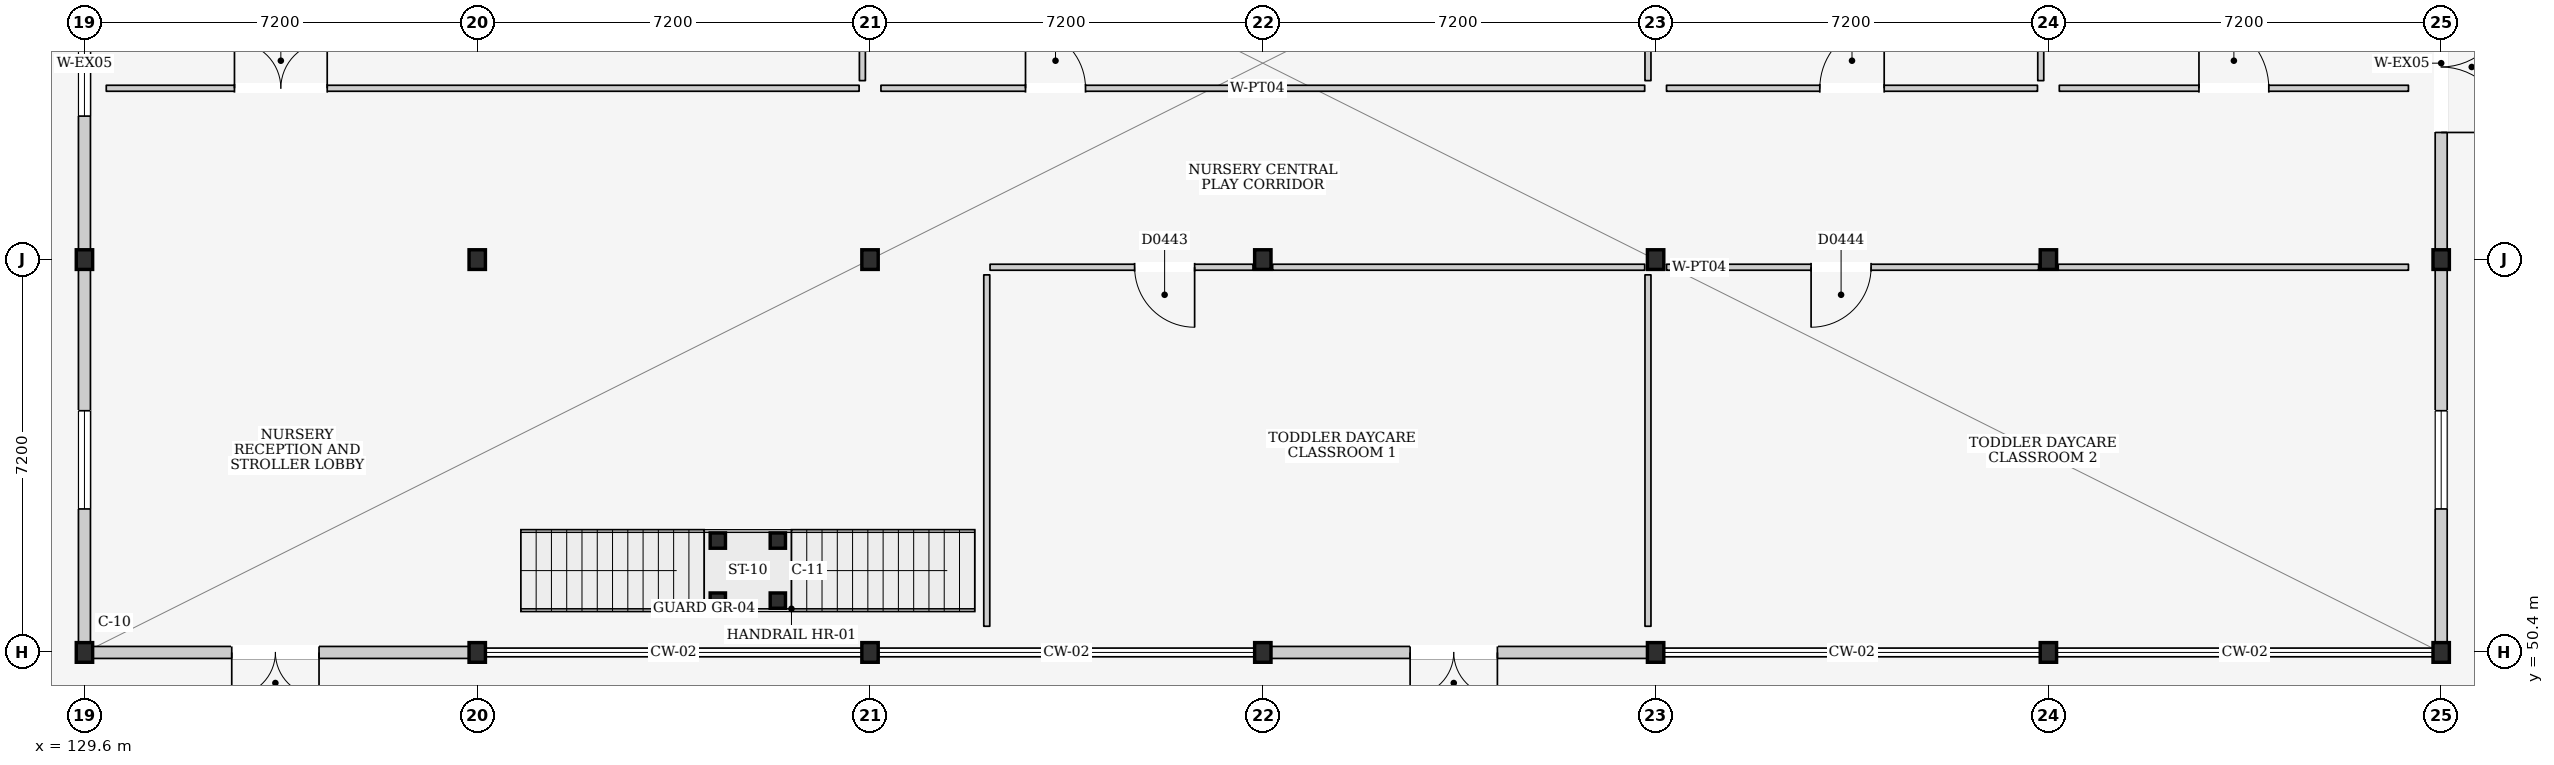
"""IFC4 building model, lengths in metres.
Left out: names, types, materials, properties, quantities, classifications, styles, units other than length and angle.
Written with IfcOpenShell. Run it as: python <this file> out.ifc"""

import sys

from ifc_helpers import new_model, si_unit, direction, frame, frame_2d, origin, origin_2d, place, context, subcontext, project, spatial, rectangle, i_section, extrude, element, fill, save


model = new_model("IFC4")
c1 = context("Model", 3, precision=1e-05, world=origin(), true_north=direction((0.0, 1.0)))
c2 = subcontext(c1, "Body", "Model", "MODEL_VIEW")
j1 = project(units=[si_unit("LENGTHUNIT", "METRE"), si_unit("PLANEANGLEUNIT", "RADIAN")], contexts=[c1])
p1 = place(None, origin())
s1 = spatial("IfcSite", under=j1, at=p1, CompositionType="ELEMENT")
p2 = place(p1, origin())
s2 = spatial("IfcBuilding", under=s1, at=p2, CompositionType="ELEMENT")
p3 = place(p2, origin())
s3 = spatial("IfcBuildingStorey", under=s2, at=p3, CompositionType="ELEMENT", Elevation=0.0)
for number, where, z_axis, x_axis in (
    (1, (129.6, 50.4, 0.0), (0.0, 0.0, 1.0), (1.0, 0.0, 0.0)),
    (2, (129.6, 57.6, 0.0), (0.0, 0.0, 1.0), (1.0, 0.0, 0.0)),
    (3, (136.8, 50.4, 0.0), (0.0, 0.0, 1.0), (1.0, 0.0, 0.0)),
    (4, (136.8, 57.6, 0.0), (0.0, 0.0, 1.0), (1.0, 0.0, 0.0)),
    (5, (144.0, 50.4, 0.0), (0.0, 0.0, 1.0), (1.0, 0.0, 0.0)),
    (6, (144.0, 57.6, 0.0), (0.0, 0.0, 1.0), (1.0, 0.0, 0.0)),
    (7, (151.2, 50.4, 0.0), (0.0, 0.0, 1.0), (1.0, 0.0, 0.0)),
    (8, (151.2, 57.6, 0.0), (0.0, 0.0, 1.0), (1.0, 0.0, 0.0)),
    (9, (158.4, 50.4, 0.0), (0.0, 0.0, 1.0), (1.0, 0.0, 0.0)),
    (10, (158.4, 57.6, 0.0), (0.0, 0.0, 1.0), (1.0, 0.0, 0.0)),
    (11, (165.6, 50.4, 0.0), (0.0, 0.0, 1.0), (1.0, 0.0, 0.0)),
    (12, (165.6, 57.6, 0.0), (0.0, 0.0, 1.0), (1.0, 0.0, 0.0)),
    (13, (172.8, 50.4, 0.0), (0.0, 0.0, 1.0), (1.0, 0.0, 0.0)),
    (14, (172.8, 57.6, 0.0), (0.0, 0.0, 1.0), (1.0, 0.0, 0.0)),
):
    element("IfcColumn", number, at=place(p3, frame(where, z_axis=z_axis, x_axis=x_axis)), inside=s3, PredefinedType="COLUMN", context=c2, shape_type="SweptSolid", body=[
        extrude(i_section(OverallWidth=0.3, OverallDepth=0.36, WebThickness=0.012, FlangeThickness=0.022, at=origin_2d()), origin(), (0.0, 0.0, 1.0), 4.5),
    ])
p4 = place(p3, frame((129.75, 50.4, 0.0), z_axis=(0.0, 0.0, 1.0), x_axis=(1.0, 0.0, 0.0)))
e15 = element("IfcWall", 15, at=p4, inside=s3, PredefinedType="ELEMENTEDWALL", context=c2, shape_type="SweptSolid", body=[
    extrude(rectangle(XDim=6.9, YDim=0.22, at=frame_2d((3.45, 0.0))), origin(), (0.0, 0.0, 1.0), 3.585),
])
p5 = place(p4, frame((2.55, 0.0, 0.0)))
e16 = element("IfcOpeningElement", 16, at=p5, cuts=e15, PredefinedType="OPENING", context=c2, shape_type="SweptSolid", body=[
    extrude(rectangle(XDim=1.6, YDim=2.2, at=frame_2d((0.8, 1.1))), frame((0.0, 0.125, 0.0), z_axis=(0.0, -1.0, 0.0), x_axis=(1.0, 0.0, 0.0)), (0.0, 0.0, 1.0), 0.25),
])
p6 = place(p3, frame((151.35, 50.4, 0.0), z_axis=(0.0, 0.0, 1.0), x_axis=(1.0, 0.0, 0.0)))
e17 = element("IfcWall", 17, at=p6, inside=s3, PredefinedType="ELEMENTEDWALL", context=c2, shape_type="SweptSolid", body=[
    extrude(rectangle(XDim=6.9, YDim=0.22, at=frame_2d((3.45, 0.0))), origin(), (0.0, 0.0, 1.0), 3.585),
])
p7 = place(p6, frame((2.55, 0.0, 0.0)))
e18 = element("IfcOpeningElement", 18, at=p7, cuts=e17, PredefinedType="OPENING", context=c2, shape_type="SweptSolid", body=[
    extrude(rectangle(XDim=1.6, YDim=2.2, at=frame_2d((0.8, 1.1))), frame((0.0, 0.125, 0.0), z_axis=(0.0, -1.0, 0.0), x_axis=(1.0, 0.0, 0.0)), (0.0, 0.0, 1.0), 0.25),
])
p8 = place(p3, frame((129.6, 50.58, 0.0), z_axis=(0.0, 0.0, 1.0), x_axis=(0.0, 1.0, 0.0)))
e19 = element("IfcWall", 19, at=p8, inside=s3, PredefinedType="ELEMENTEDWALL", context=c2, shape_type="SweptSolid", body=[
    extrude(rectangle(XDim=6.84, YDim=0.22, at=frame_2d((3.42, 0.0))), origin(), (0.0, 0.0, 1.0), 3.585),
])
p9 = place(p8, frame((2.45, 0.0, 0.9)))
e20 = element("IfcOpeningElement", 20, at=p9, cuts=e19, PredefinedType="OPENING", context=c2, shape_type="SweptSolid", body=[
    extrude(rectangle(XDim=1.8, YDim=1.8, at=frame_2d((0.9, 0.9))), frame((0.0, 0.125, 0.0), z_axis=(0.0, -1.0, 0.0), x_axis=(1.0, 0.0, 0.0)), (0.0, 0.0, 1.0), 0.25),
])
p10 = place(p3, frame((172.8, 50.58, 0.0), z_axis=(0.0, 0.0, 1.0), x_axis=(0.0, 1.0, 0.0)))
e21 = element("IfcWall", 21, at=p10, inside=s3, PredefinedType="ELEMENTEDWALL", context=c2, shape_type="SweptSolid", body=[
    extrude(rectangle(XDim=6.84, YDim=0.22, at=frame_2d((3.42, 0.0))), origin(), (0.0, 0.0, 1.0), 3.585),
])
p11 = place(p10, frame((2.45, 0.0, 0.9)))
e22 = element("IfcOpeningElement", 22, at=p11, cuts=e21, PredefinedType="OPENING", context=c2, shape_type="SweptSolid", body=[
    extrude(rectangle(XDim=1.8, YDim=1.8, at=frame_2d((0.9, 0.9))), frame((0.0, 0.125, 0.0), z_axis=(0.0, -1.0, 0.0), x_axis=(1.0, 0.0, 0.0)), (0.0, 0.0, 1.0), 0.25),
])
p12 = place(p3, frame((129.6, 57.78, 0.0), z_axis=(0.0, 0.0, 1.0), x_axis=(0.0, 1.0, 0.0)))
e23 = element("IfcWall", 23, at=p12, inside=s3, PredefinedType="ELEMENTEDWALL", context=c2, shape_type="SweptSolid", body=[
    extrude(rectangle(XDim=6.84, YDim=0.22, at=frame_2d((3.42, 0.0))), origin(), (0.0, 0.0, 1.0), 3.585),
])
p13 = place(p12, frame((2.45, 0.0, 0.9)))
e24 = element("IfcOpeningElement", 24, at=p13, cuts=e23, PredefinedType="OPENING", context=c2, shape_type="SweptSolid", body=[
    extrude(rectangle(XDim=1.8, YDim=1.8, at=frame_2d((0.9, 0.9))), frame((0.0, 0.125, 0.0), z_axis=(0.0, -1.0, 0.0), x_axis=(1.0, 0.0, 0.0)), (0.0, 0.0, 1.0), 0.25),
])
p14 = place(p3, frame((172.8, 57.78, 0.0), z_axis=(0.0, 0.0, 1.0), x_axis=(0.0, 1.0, 0.0)))
e25 = element("IfcWall", 25, at=p14, inside=s3, PredefinedType="ELEMENTEDWALL", context=c2, shape_type="SweptSolid", body=[
    extrude(rectangle(XDim=6.84, YDim=0.22, at=frame_2d((3.42, 0.0))), origin(), (0.0, 0.0, 1.0), 3.585),
])
p15 = place(p14, frame((2.15, 0.0, 0.0)))
e26 = element("IfcOpeningElement", 26, at=p15, cuts=e25, PredefinedType="OPENING", context=c2, shape_type="SweptSolid", body=[
    extrude(rectangle(XDim=2.4, YDim=2.4, at=frame_2d((1.2, 1.2))), frame((0.0, 0.125, 0.0), z_axis=(0.0, -1.0, 0.0), x_axis=(1.0, 0.0, 0.0)), (0.0, 0.0, 1.0), 0.25),
])
for number, where, z_axis, x_axis in (
    (27, (141.21, 51.35, 0.0), (0.0, 0.0, 1.0), (1.0, 0.0, 0.0)),
    (28, (142.31, 51.35, 0.0), (0.0, 0.0, 1.0), (1.0, 0.0, 0.0)),
    (29, (141.21, 52.45, 0.0), (0.0, 0.0, 1.0), (1.0, 0.0, 0.0)),
    (30, (142.31, 52.45, 0.0), (0.0, 0.0, 1.0), (1.0, 0.0, 0.0)),
):
    element("IfcColumn", number, at=place(p3, frame(where, z_axis=z_axis, x_axis=x_axis)), inside=s3, PredefinedType="COLUMN", context=c2, shape_type="SweptSolid", body=[
        extrude(i_section(OverallWidth=0.28, OverallDepth=0.28, WebThickness=0.01, FlangeThickness=0.018, at=origin_2d()), origin(), (0.0, 0.0, 1.0), 2.05),
    ])
p16 = place(p3, frame((146.2, 57.46, 0.0), z_axis=(0.0, 0.0, 1.0), x_axis=(1.0, 0.0, 0.0)))
e31 = element("IfcWall", 31, at=p16, inside=s3, PredefinedType="PARTITIONING", context=c2, shape_type="SweptSolid", body=[
    extrude(rectangle(XDim=4.82, YDim=0.11, at=frame_2d((2.41, 0.0))), origin(), (0.0, 0.0, 1.0), 3.585),
])
p17 = place(p16, frame((2.65, 0.0, 0.0)))
e32 = element("IfcOpeningElement", 32, at=p17, cuts=e31, PredefinedType="OPENING", context=c2, shape_type="SweptSolid", body=[
    extrude(rectangle(XDim=1.1, YDim=2.25, at=frame_2d((0.55, 1.125))), frame((0.0, 0.07, 0.0), z_axis=(0.0, -1.0, 0.0), x_axis=(1.0, 0.0, 0.0)), (0.0, 0.0, 1.0), 0.14),
])
p18 = place(p3, frame((151.38, 57.46, 0.0), z_axis=(0.0, 0.0, 1.0), x_axis=(1.0, 0.0, 0.0)))
e33 = element("IfcWall", 33, at=p18, inside=s3, PredefinedType="PARTITIONING", context=c2, shape_type="SweptSolid", body=[
    extrude(rectangle(XDim=6.82, YDim=0.11, at=frame_2d((3.41, 0.0))), origin(), (0.0, 0.0, 1.0), 3.585),
])
p19 = place(p3, frame((146.14, 50.88, 0.0), z_axis=(0.0, 0.0, 1.0), x_axis=(0.0, 1.0, 0.0)))
e34 = element("IfcWall", 34, at=p19, inside=s3, PredefinedType="PARTITIONING", context=c2, shape_type="SweptSolid", body=[
    extrude(rectangle(XDim=6.44, YDim=0.11, at=frame_2d((3.22, 0.0))), origin(), (0.0, 0.0, 1.0), 4.2),
])
p20 = place(p3, frame((158.26, 50.88, 0.0), z_axis=(0.0, 0.0, 1.0), x_axis=(0.0, 1.0, 0.0)))
e35 = element("IfcWall", 35, at=p20, inside=s3, PredefinedType="PARTITIONING", context=c2, shape_type="SweptSolid", body=[
    extrude(rectangle(XDim=6.44, YDim=0.11, at=frame_2d((3.22, 0.0))), origin(), (0.0, 0.0, 1.0), 3.585),
])
p21 = place(p3, frame((158.6, 57.46, 0.0), z_axis=(0.0, 0.0, 1.0), x_axis=(1.0, 0.0, 0.0)))
e36 = element("IfcWall", 36, at=p21, inside=s3, PredefinedType="PARTITIONING", context=c2, shape_type="SweptSolid", body=[
    extrude(rectangle(XDim=6.82, YDim=0.11, at=frame_2d((3.41, 0.0))), origin(), (0.0, 0.0, 1.0), 3.585),
])
p22 = place(p21, frame((2.65, 0.0, 0.0)))
e37 = element("IfcOpeningElement", 37, at=p22, cuts=e36, PredefinedType="OPENING", context=c2, shape_type="SweptSolid", body=[
    extrude(rectangle(XDim=1.1, YDim=2.25, at=frame_2d((0.55, 1.125))), frame((0.0, 0.07, 0.0), z_axis=(0.0, -1.0, 0.0), x_axis=(1.0, 0.0, 0.0)), (0.0, 0.0, 1.0), 0.14),
])
p23 = place(p3, frame((165.78, 57.46, 0.0), z_axis=(0.0, 0.0, 1.0), x_axis=(1.0, 0.0, 0.0)))
e38 = element("IfcWall", 38, at=p23, inside=s3, PredefinedType="PARTITIONING", context=c2, shape_type="SweptSolid", body=[
    extrude(rectangle(XDim=6.42, YDim=0.11, at=frame_2d((3.21, 0.0))), origin(), (0.0, 0.0, 1.0), 3.585),
])
p24 = place(p3, frame((130.0, 60.74, 0.0), z_axis=(0.0, 0.0, 1.0), x_axis=(1.0, 0.0, 0.0)))
e39 = element("IfcWall", 39, at=p24, inside=s3, PredefinedType="PARTITIONING", context=c2, shape_type="SweptSolid", body=[
    extrude(rectangle(XDim=13.8, YDim=0.11, at=frame_2d((6.9, 0.0))), origin(), (0.0, 0.0, 1.0), 4.2),
])
p25 = place(p24, frame((2.35, 0.0, 0.0)))
e40 = element("IfcOpeningElement", 40, at=p25, cuts=e39, PredefinedType="OPENING", context=c2, shape_type="SweptSolid", body=[
    extrude(rectangle(XDim=1.7, YDim=2.35, at=frame_2d((0.85, 1.175))), frame((0.0, 0.07, 0.0), z_axis=(0.0, -1.0, 0.0), x_axis=(1.0, 0.0, 0.0)), (0.0, 0.0, 1.0), 0.14),
])
p26 = place(p3, frame((143.86, 60.88, 0.0), z_axis=(0.0, 0.0, 1.0), x_axis=(0.0, 1.0, 0.0)))
e41 = element("IfcWall", 41, at=p26, inside=s3, PredefinedType="PARTITIONING", context=c2, shape_type="SweptSolid", body=[
    extrude(rectangle(XDim=3.74, YDim=0.11, at=frame_2d((1.87, 0.0))), origin(), (0.0, 0.0, 1.0), 3.585),
])
p27 = place(p3, frame((144.2, 60.74, 0.0), z_axis=(0.0, 0.0, 1.0), x_axis=(1.0, 0.0, 0.0)))
e42 = element("IfcWall", 42, at=p27, inside=s3, PredefinedType="PARTITIONING", context=c2, shape_type="SweptSolid", body=[
    extrude(rectangle(XDim=14.0, YDim=0.11, at=frame_2d((7.0, 0.0))), origin(), (0.0, 0.0, 1.0), 4.2),
])
p28 = place(p27, frame((2.65, 0.0, 0.0)))
e43 = element("IfcOpeningElement", 43, at=p28, cuts=e42, PredefinedType="OPENING", context=c2, shape_type="SweptSolid", body=[
    extrude(rectangle(XDim=1.1, YDim=2.25, at=frame_2d((0.55, 1.125))), frame((0.0, 0.07, 0.0), z_axis=(0.0, -1.0, 0.0), x_axis=(1.0, 0.0, 0.0)), (0.0, 0.0, 1.0), 0.14),
])
p29 = place(p3, frame((158.26, 60.88, 0.0), z_axis=(0.0, 0.0, 1.0), x_axis=(0.0, 1.0, 0.0)))
e44 = element("IfcWall", 44, at=p29, inside=s3, PredefinedType="PARTITIONING", context=c2, shape_type="SweptSolid", body=[
    extrude(rectangle(XDim=3.74, YDim=0.11, at=frame_2d((1.87, 0.0))), origin(), (0.0, 0.0, 1.0), 3.585),
])
p30 = place(p3, frame((158.6, 60.74, 0.0), z_axis=(0.0, 0.0, 1.0), x_axis=(1.0, 0.0, 0.0)))
e45 = element("IfcWall", 45, at=p30, inside=s3, PredefinedType="PARTITIONING", context=c2, shape_type="SweptSolid", body=[
    extrude(rectangle(XDim=6.8, YDim=0.11, at=frame_2d((3.4, 0.0))), origin(), (0.0, 0.0, 1.0), 4.2),
])
p31 = place(p30, frame((2.81, 0.0, 0.0)))
e46 = element("IfcOpeningElement", 46, at=p31, cuts=e45, PredefinedType="OPENING", context=c2, shape_type="SweptSolid", body=[
    extrude(rectangle(XDim=1.18, YDim=2.25, at=frame_2d((0.59, 1.125))), frame((0.0, 0.07, 0.0), z_axis=(0.0, -1.0, 0.0), x_axis=(1.0, 0.0, 0.0)), (0.0, 0.0, 1.0), 0.14),
])
p32 = place(p3, frame((165.46, 60.88, 0.0), z_axis=(0.0, 0.0, 1.0), x_axis=(0.0, 1.0, 0.0)))
e47 = element("IfcWall", 47, at=p32, inside=s3, PredefinedType="PARTITIONING", context=c2, shape_type="SweptSolid", body=[
    extrude(rectangle(XDim=3.74, YDim=0.11, at=frame_2d((1.87, 0.0))), origin(), (0.0, 0.0, 1.0), 3.585),
])
p33 = place(p3, frame((165.8, 60.74, 0.0), z_axis=(0.0, 0.0, 1.0), x_axis=(1.0, 0.0, 0.0)))
e48 = element("IfcWall", 48, at=p33, inside=s3, PredefinedType="PARTITIONING", context=c2, shape_type="SweptSolid", body=[
    extrude(rectangle(XDim=6.4, YDim=0.11, at=frame_2d((3.2, 0.0))), origin(), (0.0, 0.0, 1.0), 4.2),
])
p34 = place(p33, frame((2.56, 0.0, 0.0)))
e49 = element("IfcOpeningElement", 49, at=p34, cuts=e48, PredefinedType="OPENING", context=c2, shape_type="SweptSolid", body=[
    extrude(rectangle(XDim=1.28, YDim=2.28, at=frame_2d((0.64, 1.14))), frame((0.0, 0.07, 0.0), z_axis=(0.0, -1.0, 0.0), x_axis=(1.0, 0.0, 0.0)), (0.0, 0.0, 1.0), 0.14),
])
p35 = place(p5, frame((1.6, 0.0, 0.0), z_axis=(0.0, 0.0, 1.0), x_axis=(-1.0, 0.0, 0.0)))
e50 = element("IfcDoor", 50, at=p35, inside=s3, OperationType="DOUBLE_DOOR_SINGLE_SWING", PredefinedType="DOOR", context=c2, shape_type="SweptSolid", body=[
    extrude(rectangle(XDim=1.6, YDim=2.2, at=frame_2d((0.8, 1.1))), frame((0.0, 0.025, 0.0), z_axis=(0.0, -1.0, 0.0), x_axis=(1.0, 0.0, 0.0)), (0.0, 0.0, 1.0), 0.05),
])
fill(e16, e50)
p36 = place(p7, frame((1.6, 0.0, 0.0), z_axis=(0.0, 0.0, 1.0), x_axis=(-1.0, 0.0, 0.0)))
e51 = element("IfcDoor", 51, at=p36, inside=s3, OperationType="DOUBLE_DOOR_SINGLE_SWING", PredefinedType="DOOR", context=c2, shape_type="SweptSolid", body=[
    extrude(rectangle(XDim=1.6, YDim=2.2, at=frame_2d((0.8, 1.1))), frame((0.0, 0.025, 0.0), z_axis=(0.0, -1.0, 0.0), x_axis=(1.0, 0.0, 0.0)), (0.0, 0.0, 1.0), 0.05),
])
fill(e18, e51)
p37 = place(p9, origin())
e52 = element("IfcWindow", 52, at=p37, inside=s3, PartitioningType="DOUBLE_PANEL_VERTICAL", PredefinedType="WINDOW", context=c2, shape_type="SweptSolid", body=[
    extrude(rectangle(XDim=1.8, YDim=1.8, at=frame_2d((0.9, 0.9))), frame((0.0, 0.03, 0.0), z_axis=(0.0, -1.0, 0.0), x_axis=(1.0, 0.0, 0.0)), (0.0, 0.0, 1.0), 0.06),
])
fill(e20, e52)
p38 = place(p11, origin())
e53 = element("IfcWindow", 53, at=p38, inside=s3, PartitioningType="DOUBLE_PANEL_VERTICAL", PredefinedType="WINDOW", context=c2, shape_type="SweptSolid", body=[
    extrude(rectangle(XDim=1.8, YDim=1.8, at=frame_2d((0.9, 0.9))), frame((0.0, 0.03, 0.0), z_axis=(0.0, -1.0, 0.0), x_axis=(1.0, 0.0, 0.0)), (0.0, 0.0, 1.0), 0.06),
])
fill(e22, e53)
p39 = place(p13, origin())
e54 = element("IfcWindow", 54, at=p39, inside=s3, PartitioningType="DOUBLE_PANEL_VERTICAL", PredefinedType="WINDOW", context=c2, shape_type="SweptSolid", body=[
    extrude(rectangle(XDim=1.8, YDim=1.8, at=frame_2d((0.9, 0.9))), frame((0.0, 0.03, 0.0), z_axis=(0.0, -1.0, 0.0), x_axis=(1.0, 0.0, 0.0)), (0.0, 0.0, 1.0), 0.06),
])
fill(e24, e54)
p40 = place(p15, frame((2.4, 0.0, 0.0), z_axis=(0.0, 0.0, 1.0), x_axis=(-1.0, 0.0, 0.0)))
e55 = element("IfcDoor", 55, at=p40, inside=s3, OperationType="DOUBLE_DOOR_SINGLE_SWING", PredefinedType="GATE", context=c2, shape_type="SweptSolid", body=[
    extrude(rectangle(XDim=2.4, YDim=2.4, at=frame_2d((1.2, 1.2))), frame((0.0, 0.025, 0.0), z_axis=(0.0, -1.0, 0.0), x_axis=(1.0, 0.0, 0.0)), (0.0, 0.0, 1.0), 0.05),
])
fill(e26, e55)
p41 = place(p17, frame((1.1, 0.0, 0.0), z_axis=(0.0, 0.0, 1.0), x_axis=(-1.0, 0.0, 0.0)))
e56 = element("IfcDoor", 56, at=p41, inside=s3, OperationType="SINGLE_SWING_LEFT", PredefinedType="DOOR", context=c2, shape_type="SweptSolid", body=[
    extrude(rectangle(XDim=1.1, YDim=2.25, at=frame_2d((0.55, 1.125))), frame((0.0, 0.025, 0.0), z_axis=(0.0, -1.0, 0.0), x_axis=(1.0, 0.0, 0.0)), (0.0, 0.0, 1.0), 0.05),
])
fill(e32, e56)
p42 = place(p22, frame((1.1, 0.0, 0.0), z_axis=(0.0, 0.0, 1.0), x_axis=(-1.0, 0.0, 0.0)))
e57 = element("IfcDoor", 57, at=p42, inside=s3, OperationType="SINGLE_SWING_RIGHT", PredefinedType="DOOR", context=c2, shape_type="SweptSolid", body=[
    extrude(rectangle(XDim=1.1, YDim=2.25, at=frame_2d((0.55, 1.125))), frame((0.0, 0.025, 0.0), z_axis=(0.0, -1.0, 0.0), x_axis=(1.0, 0.0, 0.0)), (0.0, 0.0, 1.0), 0.05),
])
fill(e37, e57)
p43 = place(p25, origin())
e58 = element("IfcDoor", 58, at=p43, inside=s3, OperationType="DOUBLE_DOOR_SINGLE_SWING", PredefinedType="DOOR", context=c2, shape_type="SweptSolid", body=[
    extrude(rectangle(XDim=1.7, YDim=2.35, at=frame_2d((0.85, 1.175))), frame((0.0, 0.025, 0.0), z_axis=(0.0, -1.0, 0.0), x_axis=(1.0, 0.0, 0.0)), (0.0, 0.0, 1.0), 0.05),
])
fill(e40, e58)
p44 = place(p28, origin())
e59 = element("IfcDoor", 59, at=p44, inside=s3, OperationType="SINGLE_SWING_LEFT", PredefinedType="DOOR", context=c2, shape_type="SweptSolid", body=[
    extrude(rectangle(XDim=1.1, YDim=2.25, at=frame_2d((0.55, 1.125))), frame((0.0, 0.025, 0.0), z_axis=(0.0, -1.0, 0.0), x_axis=(1.0, 0.0, 0.0)), (0.0, 0.0, 1.0), 0.05),
])
fill(e43, e59)
p45 = place(p31, origin())
e60 = element("IfcDoor", 60, at=p45, inside=s3, OperationType="SINGLE_SWING_RIGHT", PredefinedType="DOOR", context=c2, shape_type="SweptSolid", body=[
    extrude(rectangle(XDim=1.18, YDim=2.25, at=frame_2d((0.59, 1.125))), frame((0.0, 0.025, 0.0), z_axis=(0.0, -1.0, 0.0), x_axis=(1.0, 0.0, 0.0)), (0.0, 0.0, 1.0), 0.05),
])
fill(e46, e60)
p46 = place(p34, origin())
e61 = element("IfcDoor", 61, at=p46, inside=s3, OperationType="SINGLE_SWING_LEFT", PredefinedType="DOOR", context=c2, shape_type="SweptSolid", body=[
    extrude(rectangle(XDim=1.28, YDim=2.28, at=frame_2d((0.64, 1.14))), frame((0.0, 0.025, 0.0), z_axis=(0.0, -1.0, 0.0), x_axis=(1.0, 0.0, 0.0)), (0.0, 0.0, 1.0), 0.05),
])
fill(e49, e61)
save(model, sys.argv[1])
